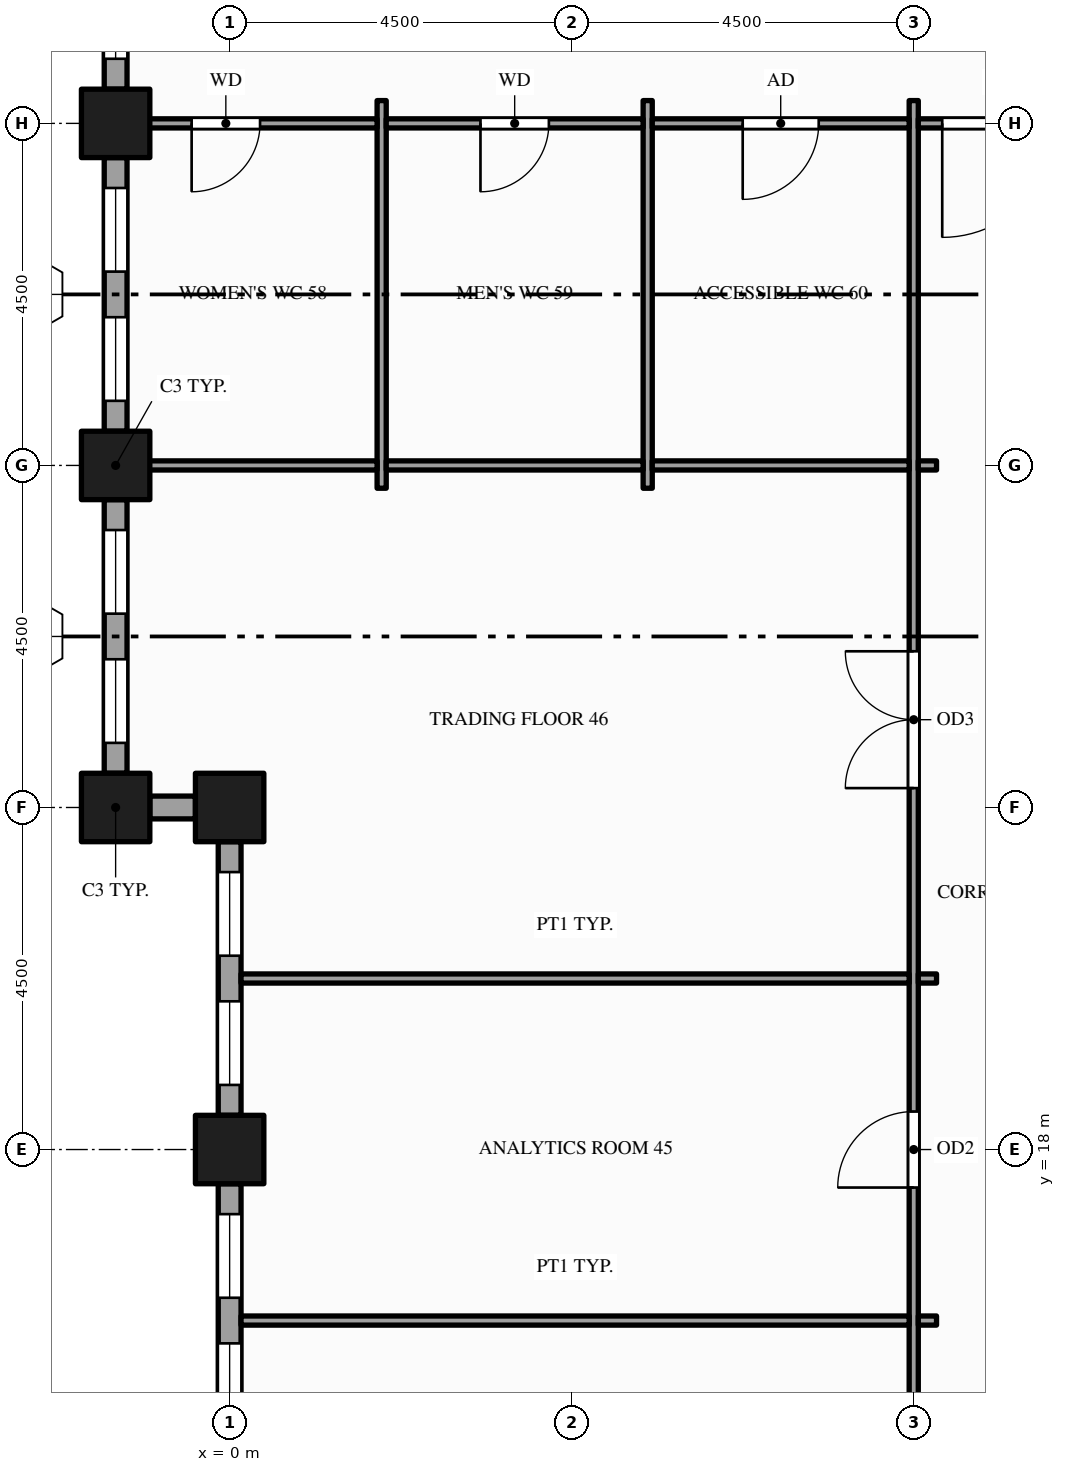
"""IFC4 building model, lengths in metres.
Left out: names, types, materials, properties, quantities, classifications, styles, units other than length and angle.
Written with IfcOpenShell. Run it as: python <this file> out.ifc"""

import sys

from ifc_helpers import new_model, si_unit, direction, frame, frame_2d, origin, origin_2d, place, context, subcontext, project, spatial, rectangle, hollow_rectangle, extrude, element, fill, save


model = new_model("IFC4")
c1 = context("Model", 3, precision=1e-05, world=origin(), true_north=direction((0.0, 1.0)))
c2 = subcontext(c1, "Body", "Model", "MODEL_VIEW")
j1 = project(units=[si_unit("LENGTHUNIT", "METRE"), si_unit("PLANEANGLEUNIT", "RADIAN")], contexts=[c1])
p1 = place(None, origin())
s1 = spatial("IfcSite", under=j1, at=p1, CompositionType="ELEMENT")
p2 = place(p1, origin())
s2 = spatial("IfcBuilding", under=s1, at=p2, CompositionType="ELEMENT")
p3 = place(p2, frame((0.0, 0.0, 143.0)))
s3 = spatial("IfcBuildingStorey", under=s2, at=p3, CompositionType="ELEMENT", Elevation=143.0)
for number, where, z_axis, x_axis in (
    (1, (-1.5, 22.5, -0.15), (0.0, 0.0, 1.0), (1.0, 0.0, 0.0)),
    (2, (-1.5, 27.0, -0.15), (0.0, 0.0, 1.0), (1.0, 0.0, 0.0)),
    (3, (-1.5, 31.5, -0.15), (0.0, 0.0, 1.0), (1.0, 0.0, 0.0)),
    (4, (0.0, 18.0, -0.15), (0.0, 0.0, 1.0), (1.0, 0.0, 0.0)),
    (5, (0.0, 22.5, -0.15), (0.0, 0.0, 1.0), (1.0, 0.0, 0.0)),
):
    element("IfcColumn", number, at=place(p3, frame(where, z_axis=z_axis, x_axis=x_axis)), inside=s3, PredefinedType="COLUMN", context=c2, shape_type="SweptSolid", body=[
        extrude(hollow_rectangle(XDim=0.9, YDim=0.9, WallThickness=0.045, at=origin_2d()), origin(), (0.0, 0.0, 1.0), 4.0),
    ])
p4 = place(p3, frame((-1.5, 35.55, 0.0), z_axis=(0.0, 0.0, 1.0), x_axis=(0.0, -1.0, 0.0)))
e6 = element("IfcWall", 6, at=p4, inside=s3, PredefinedType="STANDARD", context=c2, shape_type="SweptSolid", body=[
    extrude(rectangle(XDim=3.6, YDim=0.3, at=frame_2d((1.8, 0.0))), origin(), (0.0, 0.0, 1.0), 3.149),
])
p5 = place(p4, frame((0.4, 0.0, 0.9)))
e7 = element("IfcOpeningElement", 7, at=p5, cuts=e6, PredefinedType="OPENING", context=c2, shape_type="SweptSolid", body=[
    extrude(rectangle(XDim=1.1, YDim=2.0, at=frame_2d((0.55, 1.0))), frame((0.0, 0.16, 0.0), z_axis=(0.0, -1.0, 0.0), x_axis=(1.0, 0.0, 0.0)), (0.0, 0.0, 1.0), 0.32),
])
p6 = place(p4, frame((2.1, 0.0, 0.9)))
e8 = element("IfcOpeningElement", 8, at=p6, cuts=e6, PredefinedType="OPENING", context=c2, shape_type="SweptSolid", body=[
    extrude(rectangle(XDim=1.1, YDim=2.0, at=frame_2d((0.55, 1.0))), frame((0.0, 0.16, 0.0), z_axis=(0.0, -1.0, 0.0), x_axis=(1.0, 0.0, 0.0)), (0.0, 0.0, 1.0), 0.32),
])
p7 = place(p3, frame((-1.5, 31.05, 0.0), z_axis=(0.0, 0.0, 1.0), x_axis=(0.0, -1.0, 0.0)))
e9 = element("IfcWall", 9, at=p7, inside=s3, PredefinedType="STANDARD", context=c2, shape_type="SweptSolid", body=[
    extrude(rectangle(XDim=3.6, YDim=0.3, at=frame_2d((1.8, 0.0))), origin(), (0.0, 0.0, 1.0), 3.149),
])
p8 = place(p7, frame((0.4, 0.0, 0.9)))
e10 = element("IfcOpeningElement", 10, at=p8, cuts=e9, PredefinedType="OPENING", context=c2, shape_type="SweptSolid", body=[
    extrude(rectangle(XDim=1.1, YDim=2.0, at=frame_2d((0.55, 1.0))), frame((0.0, 0.16, 0.0), z_axis=(0.0, -1.0, 0.0), x_axis=(1.0, 0.0, 0.0)), (0.0, 0.0, 1.0), 0.32),
])
p9 = place(p7, frame((2.1, 0.0, 0.9)))
e11 = element("IfcOpeningElement", 11, at=p9, cuts=e9, PredefinedType="OPENING", context=c2, shape_type="SweptSolid", body=[
    extrude(rectangle(XDim=1.1, YDim=2.0, at=frame_2d((0.55, 1.0))), frame((0.0, 0.16, 0.0), z_axis=(0.0, -1.0, 0.0), x_axis=(1.0, 0.0, 0.0)), (0.0, 0.0, 1.0), 0.32),
])
p10 = place(p3, frame((-1.5, 26.55, 0.0), z_axis=(0.0, 0.0, 1.0), x_axis=(0.0, -1.0, 0.0)))
e12 = element("IfcWall", 12, at=p10, inside=s3, PredefinedType="STANDARD", context=c2, shape_type="SweptSolid", body=[
    extrude(rectangle(XDim=3.6, YDim=0.3, at=frame_2d((1.8, 0.0))), origin(), (0.0, 0.0, 1.0), 3.149),
])
p11 = place(p10, frame((0.4, 0.0, 0.9)))
e13 = element("IfcOpeningElement", 13, at=p11, cuts=e12, PredefinedType="OPENING", context=c2, shape_type="SweptSolid", body=[
    extrude(rectangle(XDim=1.1, YDim=2.0, at=frame_2d((0.55, 1.0))), frame((0.0, 0.16, 0.0), z_axis=(0.0, -1.0, 0.0), x_axis=(1.0, 0.0, 0.0)), (0.0, 0.0, 1.0), 0.32),
])
p12 = place(p10, frame((2.1, 0.0, 0.9)))
e14 = element("IfcOpeningElement", 14, at=p12, cuts=e12, PredefinedType="OPENING", context=c2, shape_type="SweptSolid", body=[
    extrude(rectangle(XDim=1.1, YDim=2.0, at=frame_2d((0.55, 1.0))), frame((0.0, 0.16, 0.0), z_axis=(0.0, -1.0, 0.0), x_axis=(1.0, 0.0, 0.0)), (0.0, 0.0, 1.0), 0.32),
])
p13 = place(p3, frame((-1.05, 22.5, 0.0), z_axis=(0.0, 0.0, 1.0), x_axis=(1.0, 0.0, 0.0)))
e15 = element("IfcWall", 15, at=p13, inside=s3, PredefinedType="STANDARD", context=c2, shape_type="SweptSolid", body=[
    extrude(rectangle(XDim=0.6, YDim=0.3, at=frame_2d((0.3, 0.0))), origin(), (0.0, 0.0, 1.0), 3.149),
])
p14 = place(p3, frame((0.0, 22.05, 0.0), z_axis=(0.0, 0.0, 1.0), x_axis=(0.0, -1.0, 0.0)))
e16 = element("IfcWall", 16, at=p14, inside=s3, PredefinedType="STANDARD", context=c2, shape_type="SweptSolid", body=[
    extrude(rectangle(XDim=3.6, YDim=0.3, at=frame_2d((1.8, 0.0))), origin(), (0.0, 0.0, 1.0), 3.149),
])
p15 = place(p14, frame((0.4, 0.0, 0.9)))
e17 = element("IfcOpeningElement", 17, at=p15, cuts=e16, PredefinedType="OPENING", context=c2, shape_type="SweptSolid", body=[
    extrude(rectangle(XDim=1.1, YDim=2.0, at=frame_2d((0.55, 1.0))), frame((0.0, 0.16, 0.0), z_axis=(0.0, -1.0, 0.0), x_axis=(1.0, 0.0, 0.0)), (0.0, 0.0, 1.0), 0.32),
])
p16 = place(p14, frame((2.1, 0.0, 0.9)))
e18 = element("IfcOpeningElement", 18, at=p16, cuts=e16, PredefinedType="OPENING", context=c2, shape_type="SweptSolid", body=[
    extrude(rectangle(XDim=1.1, YDim=2.0, at=frame_2d((0.55, 1.0))), frame((0.0, 0.16, 0.0), z_axis=(0.0, -1.0, 0.0), x_axis=(1.0, 0.0, 0.0)), (0.0, 0.0, 1.0), 0.32),
])
p17 = place(p3, frame((0.0, 17.55, 0.0), z_axis=(0.0, 0.0, 1.0), x_axis=(0.0, -1.0, 0.0)))
e19 = element("IfcWall", 19, at=p17, inside=s3, PredefinedType="STANDARD", context=c2, shape_type="SweptSolid", body=[
    extrude(rectangle(XDim=3.6, YDim=0.3, at=frame_2d((1.8, 0.0))), origin(), (0.0, 0.0, 1.0), 3.149),
])
p18 = place(p17, frame((0.4, 0.0, 0.9)))
e20 = element("IfcOpeningElement", 20, at=p18, cuts=e19, PredefinedType="OPENING", context=c2, shape_type="SweptSolid", body=[
    extrude(rectangle(XDim=1.1, YDim=2.0, at=frame_2d((0.55, 1.0))), frame((0.0, 0.16, 0.0), z_axis=(0.0, -1.0, 0.0), x_axis=(1.0, 0.0, 0.0)), (0.0, 0.0, 1.0), 0.32),
])
p19 = place(p17, frame((2.1, 0.0, 0.9)))
e21 = element("IfcOpeningElement", 21, at=p19, cuts=e19, PredefinedType="OPENING", context=c2, shape_type="SweptSolid", body=[
    extrude(rectangle(XDim=1.1, YDim=2.0, at=frame_2d((0.55, 1.0))), frame((0.0, 0.16, 0.0), z_axis=(0.0, -1.0, 0.0), x_axis=(1.0, 0.0, 0.0)), (0.0, 0.0, 1.0), 0.32),
])
for number, where, z_axis, x_axis in (
    (22, (2.0, 26.7, 0.0), (0.0, 0.0, 1.0), (0.0, 1.0, 0.0)),
    (23, (5.5, 26.7, 0.0), (0.0, 0.0, 1.0), (0.0, 1.0, 0.0)),
):
    element("IfcWall", number, at=place(p3, frame(where, z_axis=z_axis, x_axis=x_axis)), inside=s3, PredefinedType="PARTITIONING", context=c2, shape_type="SweptSolid", body=[
        extrude(rectangle(XDim=5.1, YDim=0.12, at=frame_2d((2.55, 0.0))), origin(), (0.0, 0.0, 1.0), 3.85),
    ])
p20 = place(p3, frame((9.0, 10.95, 0.0), z_axis=(0.0, 0.0, 1.0), x_axis=(0.0, 1.0, 0.0)))
e24 = element("IfcWall", 24, at=p20, inside=s3, PredefinedType="PARTITIONING", context=c2, shape_type="SweptSolid", body=[
    extrude(rectangle(XDim=20.85, YDim=0.12, at=frame_2d((10.425, 0.0))), origin(), (0.0, 0.0, 1.0), 2.6),
])
p21 = place(p20, frame((2.05, 0.0, 0.0)))
e25 = element("IfcOpeningElement", 25, at=p21, cuts=e24, PredefinedType="OPENING", context=c2, shape_type="SweptSolid", body=[
    extrude(rectangle(XDim=1.0, YDim=2.1, at=frame_2d((0.5, 1.05))), frame((0.0, 0.07, 0.0), z_axis=(0.0, -1.0, 0.0), x_axis=(1.0, 0.0, 0.0)), (0.0, 0.0, 1.0), 0.14),
])
p22 = place(p20, frame((6.55, 0.0, 0.0)))
e26 = element("IfcOpeningElement", 26, at=p22, cuts=e24, PredefinedType="OPENING", context=c2, shape_type="SweptSolid", body=[
    extrude(rectangle(XDim=1.0, YDim=2.1, at=frame_2d((0.5, 1.05))), frame((0.0, 0.07, 0.0), z_axis=(0.0, -1.0, 0.0), x_axis=(1.0, 0.0, 0.0)), (0.0, 0.0, 1.0), 0.14),
])
p23 = place(p20, frame((11.805, 0.0, 0.0)))
e27 = element("IfcOpeningElement", 27, at=p23, cuts=e24, PredefinedType="OPENING", context=c2, shape_type="SweptSolid", body=[
    extrude(rectangle(XDim=1.8, YDim=2.1, at=frame_2d((0.9, 1.05))), frame((0.0, 0.07, 0.0), z_axis=(0.0, -1.0, 0.0), x_axis=(1.0, 0.0, 0.0)), (0.0, 0.0, 1.0), 0.14),
])
p24 = place(p3, frame((0.15, 15.75, 0.0), z_axis=(0.0, 0.0, 1.0), x_axis=(1.0, 0.0, 0.0)))
e28 = element("IfcWall", 28, at=p24, inside=s3, PredefinedType="PARTITIONING", context=c2, shape_type="SweptSolid", body=[
    extrude(rectangle(XDim=8.79, YDim=0.12, at=frame_2d((4.395, 0.0))), origin(), (0.0, 0.0, 1.0), 2.87),
])
p25 = place(p3, frame((9.06, 15.75, 0.0), z_axis=(0.0, 0.0, 1.0), x_axis=(1.0, 0.0, 0.0)))
e29 = element("IfcWall", 29, at=p25, inside=s3, PredefinedType="PARTITIONING", context=c2, shape_type="SweptSolid", body=[
    extrude(rectangle(XDim=0.24, YDim=0.12, at=frame_2d((0.12, 0.0))), origin(), (0.0, 0.0, 1.0), 2.87),
])
p26 = place(p3, frame((0.15, 20.25, 0.0), z_axis=(0.0, 0.0, 1.0), x_axis=(1.0, 0.0, 0.0)))
e30 = element("IfcWall", 30, at=p26, inside=s3, PredefinedType="PARTITIONING", context=c2, shape_type="SweptSolid", body=[
    extrude(rectangle(XDim=8.79, YDim=0.12, at=frame_2d((4.395, 0.0))), origin(), (0.0, 0.0, 1.0), 2.87),
])
p27 = place(p3, frame((9.06, 20.25, 0.0), z_axis=(0.0, 0.0, 1.0), x_axis=(1.0, 0.0, 0.0)))
e31 = element("IfcWall", 31, at=p27, inside=s3, PredefinedType="PARTITIONING", context=c2, shape_type="SweptSolid", body=[
    extrude(rectangle(XDim=0.24, YDim=0.12, at=frame_2d((0.12, 0.0))), origin(), (0.0, 0.0, 1.0), 2.87),
])
p28 = place(p3, frame((-1.35, 27.0, 0.0), z_axis=(0.0, 0.0, 1.0), x_axis=(1.0, 0.0, 0.0)))
e32 = element("IfcWall", 32, at=p28, inside=s3, PredefinedType="PARTITIONING", context=c2, shape_type="SweptSolid", body=[
    extrude(rectangle(XDim=3.29, YDim=0.12, at=frame_2d((1.645, 0.0))), origin(), (0.0, 0.0, 1.0), 2.87),
])
for number, where, z_axis, x_axis in (
    (33, (2.06, 27.0, 0.0), (0.0, 0.0, 1.0), (1.0, 0.0, 0.0)),
    (34, (5.56, 27.0, 0.0), (0.0, 0.0, 1.0), (1.0, 0.0, 0.0)),
):
    element("IfcWall", number, at=place(p3, frame(where, z_axis=z_axis, x_axis=x_axis)), inside=s3, PredefinedType="PARTITIONING", context=c2, shape_type="SweptSolid", body=[
        extrude(rectangle(XDim=3.38, YDim=0.12, at=frame_2d((1.69, 0.0))), origin(), (0.0, 0.0, 1.0), 2.87),
    ])
p29 = place(p3, frame((9.06, 27.0, 0.0), z_axis=(0.0, 0.0, 1.0), x_axis=(1.0, 0.0, 0.0)))
e35 = element("IfcWall", 35, at=p29, inside=s3, PredefinedType="PARTITIONING", context=c2, shape_type="SweptSolid", body=[
    extrude(rectangle(XDim=0.24, YDim=0.12, at=frame_2d((0.12, 0.0))), origin(), (0.0, 0.0, 1.0), 2.87),
])
p30 = place(p3, frame((-1.35, 31.5, 0.0), z_axis=(0.0, 0.0, 1.0), x_axis=(1.0, 0.0, 0.0)))
e36 = element("IfcWall", 36, at=p30, inside=s3, PredefinedType="PARTITIONING", context=c2, shape_type="SweptSolid", body=[
    extrude(rectangle(XDim=3.29, YDim=0.12, at=frame_2d((1.645, 0.0))), origin(), (0.0, 0.0, 1.0), 2.87),
])
p31 = place(p30, frame((0.85, 0.0, 0.0)))
e37 = element("IfcOpeningElement", 37, at=p31, cuts=e36, PredefinedType="OPENING", context=c2, shape_type="SweptSolid", body=[
    extrude(rectangle(XDim=0.9, YDim=2.1, at=frame_2d((0.45, 1.05))), frame((0.0, 0.07, 0.0), z_axis=(0.0, -1.0, 0.0), x_axis=(1.0, 0.0, 0.0)), (0.0, 0.0, 1.0), 0.14),
])
p32 = place(p3, frame((2.06, 31.5, 0.0), z_axis=(0.0, 0.0, 1.0), x_axis=(1.0, 0.0, 0.0)))
e38 = element("IfcWall", 38, at=p32, inside=s3, PredefinedType="PARTITIONING", context=c2, shape_type="SweptSolid", body=[
    extrude(rectangle(XDim=3.38, YDim=0.12, at=frame_2d((1.69, 0.0))), origin(), (0.0, 0.0, 1.0), 2.87),
])
p33 = place(p32, frame((1.24, 0.0, 0.0)))
e39 = element("IfcOpeningElement", 39, at=p33, cuts=e38, PredefinedType="OPENING", context=c2, shape_type="SweptSolid", body=[
    extrude(rectangle(XDim=0.9, YDim=2.1, at=frame_2d((0.45, 1.05))), frame((0.0, 0.07, 0.0), z_axis=(0.0, -1.0, 0.0), x_axis=(1.0, 0.0, 0.0)), (0.0, 0.0, 1.0), 0.14),
])
p34 = place(p3, frame((5.56, 31.5, 0.0), z_axis=(0.0, 0.0, 1.0), x_axis=(1.0, 0.0, 0.0)))
e40 = element("IfcWall", 40, at=p34, inside=s3, PredefinedType="PARTITIONING", context=c2, shape_type="SweptSolid", body=[
    extrude(rectangle(XDim=3.38, YDim=0.12, at=frame_2d((1.69, 0.0))), origin(), (0.0, 0.0, 1.0), 2.87),
])
p35 = place(p34, frame((1.19, 0.0, 0.0)))
e41 = element("IfcOpeningElement", 41, at=p35, cuts=e40, PredefinedType="OPENING", context=c2, shape_type="SweptSolid", body=[
    extrude(rectangle(XDim=1.0, YDim=2.1, at=frame_2d((0.5, 1.05))), frame((0.0, 0.07, 0.0), z_axis=(0.0, -1.0, 0.0), x_axis=(1.0, 0.0, 0.0)), (0.0, 0.0, 1.0), 0.14),
])
p36 = place(p3, frame((9.06, 31.5, 0.0), z_axis=(0.0, 0.0, 1.0), x_axis=(1.0, 0.0, 0.0)))
e42 = element("IfcWall", 42, at=p36, inside=s3, PredefinedType="PARTITIONING", context=c2, shape_type="SweptSolid", body=[
    extrude(rectangle(XDim=2.13, YDim=0.12, at=frame_2d((1.065, 0.0))), origin(), (0.0, 0.0, 1.0), 2.87),
])
p37 = place(p36, frame((0.315, 0.0, 0.0)))
e43 = element("IfcOpeningElement", 43, at=p37, cuts=e42, PredefinedType="OPENING", context=c2, shape_type="SweptSolid", body=[
    extrude(rectangle(XDim=1.5, YDim=2.1, at=frame_2d((0.75, 1.05))), frame((0.0, 0.07, 0.0), z_axis=(0.0, -1.0, 0.0), x_axis=(1.0, 0.0, 0.0)), (0.0, 0.0, 1.0), 0.14),
])
p38 = place(p6, origin())
e44 = element("IfcWindow", 44, at=p38, inside=s3, PartitioningType="SINGLE_PANEL", PredefinedType="WINDOW", context=c2, shape_type="SweptSolid", body=[
    extrude(rectangle(XDim=1.1, YDim=2.0, at=frame_2d((0.55, 1.0))), frame((0.0, 0.03, 0.0), z_axis=(0.0, -1.0, 0.0), x_axis=(1.0, 0.0, 0.0)), (0.0, 0.0, 1.0), 0.06),
])
fill(e8, e44)
p39 = place(p8, origin())
e45 = element("IfcWindow", 45, at=p39, inside=s3, PartitioningType="SINGLE_PANEL", PredefinedType="WINDOW", context=c2, shape_type="SweptSolid", body=[
    extrude(rectangle(XDim=1.1, YDim=2.0, at=frame_2d((0.55, 1.0))), frame((0.0, 0.03, 0.0), z_axis=(0.0, -1.0, 0.0), x_axis=(1.0, 0.0, 0.0)), (0.0, 0.0, 1.0), 0.06),
])
fill(e10, e45)
p40 = place(p9, origin())
e46 = element("IfcWindow", 46, at=p40, inside=s3, PartitioningType="SINGLE_PANEL", PredefinedType="WINDOW", context=c2, shape_type="SweptSolid", body=[
    extrude(rectangle(XDim=1.1, YDim=2.0, at=frame_2d((0.55, 1.0))), frame((0.0, 0.03, 0.0), z_axis=(0.0, -1.0, 0.0), x_axis=(1.0, 0.0, 0.0)), (0.0, 0.0, 1.0), 0.06),
])
fill(e11, e46)
p41 = place(p11, origin())
e47 = element("IfcWindow", 47, at=p41, inside=s3, PartitioningType="SINGLE_PANEL", PredefinedType="WINDOW", context=c2, shape_type="SweptSolid", body=[
    extrude(rectangle(XDim=1.1, YDim=2.0, at=frame_2d((0.55, 1.0))), frame((0.0, 0.03, 0.0), z_axis=(0.0, -1.0, 0.0), x_axis=(1.0, 0.0, 0.0)), (0.0, 0.0, 1.0), 0.06),
])
fill(e13, e47)
p42 = place(p12, origin())
e48 = element("IfcWindow", 48, at=p42, inside=s3, PartitioningType="SINGLE_PANEL", PredefinedType="WINDOW", context=c2, shape_type="SweptSolid", body=[
    extrude(rectangle(XDim=1.1, YDim=2.0, at=frame_2d((0.55, 1.0))), frame((0.0, 0.03, 0.0), z_axis=(0.0, -1.0, 0.0), x_axis=(1.0, 0.0, 0.0)), (0.0, 0.0, 1.0), 0.06),
])
fill(e14, e48)
p43 = place(p15, origin())
e49 = element("IfcWindow", 49, at=p43, inside=s3, PartitioningType="SINGLE_PANEL", PredefinedType="WINDOW", context=c2, shape_type="SweptSolid", body=[
    extrude(rectangle(XDim=1.1, YDim=2.0, at=frame_2d((0.55, 1.0))), frame((0.0, 0.03, 0.0), z_axis=(0.0, -1.0, 0.0), x_axis=(1.0, 0.0, 0.0)), (0.0, 0.0, 1.0), 0.06),
])
fill(e17, e49)
p44 = place(p16, origin())
e50 = element("IfcWindow", 50, at=p44, inside=s3, PartitioningType="SINGLE_PANEL", PredefinedType="WINDOW", context=c2, shape_type="SweptSolid", body=[
    extrude(rectangle(XDim=1.1, YDim=2.0, at=frame_2d((0.55, 1.0))), frame((0.0, 0.03, 0.0), z_axis=(0.0, -1.0, 0.0), x_axis=(1.0, 0.0, 0.0)), (0.0, 0.0, 1.0), 0.06),
])
fill(e18, e50)
p45 = place(p18, origin())
e51 = element("IfcWindow", 51, at=p45, inside=s3, PartitioningType="SINGLE_PANEL", PredefinedType="WINDOW", context=c2, shape_type="SweptSolid", body=[
    extrude(rectangle(XDim=1.1, YDim=2.0, at=frame_2d((0.55, 1.0))), frame((0.0, 0.03, 0.0), z_axis=(0.0, -1.0, 0.0), x_axis=(1.0, 0.0, 0.0)), (0.0, 0.0, 1.0), 0.06),
])
fill(e20, e51)
p46 = place(p19, origin())
e52 = element("IfcWindow", 52, at=p46, inside=s3, PartitioningType="SINGLE_PANEL", PredefinedType="WINDOW", context=c2, shape_type="SweptSolid", body=[
    extrude(rectangle(XDim=1.1, YDim=2.0, at=frame_2d((0.55, 1.0))), frame((0.0, 0.03, 0.0), z_axis=(0.0, -1.0, 0.0), x_axis=(1.0, 0.0, 0.0)), (0.0, 0.0, 1.0), 0.06),
])
fill(e21, e52)
p47 = place(p37, origin())
e53 = element("IfcDoor", 53, at=p47, inside=s3, OperationType="SINGLE_SWING_LEFT", PredefinedType="DOOR", context=c2, shape_type="SweptSolid", body=[
    extrude(rectangle(XDim=1.5, YDim=2.1, at=frame_2d((0.75, 1.05))), frame((0.0, 0.025, 0.0), z_axis=(0.0, -1.0, 0.0), x_axis=(1.0, 0.0, 0.0)), (0.0, 0.0, 1.0), 0.05),
])
fill(e43, e53)
p48 = place(p22, origin())
e54 = element("IfcDoor", 54, at=p48, inside=s3, OperationType="SINGLE_SWING_LEFT", PredefinedType="DOOR", context=c2, shape_type="SweptSolid", body=[
    extrude(rectangle(XDim=1.0, YDim=2.1, at=frame_2d((0.5, 1.05))), frame((0.0, 0.025, 0.0), z_axis=(0.0, -1.0, 0.0), x_axis=(1.0, 0.0, 0.0)), (0.0, 0.0, 1.0), 0.05),
])
fill(e26, e54)
p49 = place(p23, origin())
e55 = element("IfcDoor", 55, at=p49, inside=s3, OperationType="DOUBLE_DOOR_SINGLE_SWING", PredefinedType="DOOR", context=c2, shape_type="SweptSolid", body=[
    extrude(rectangle(XDim=1.8, YDim=2.1, at=frame_2d((0.9, 1.05))), frame((0.0, 0.025, 0.0), z_axis=(0.0, -1.0, 0.0), x_axis=(1.0, 0.0, 0.0)), (0.0, 0.0, 1.0), 0.05),
])
fill(e27, e55)
p50 = place(p31, origin())
e56 = element("IfcDoor", 56, at=p50, inside=s3, OperationType="SINGLE_SWING_LEFT", PredefinedType="DOOR", context=c2, shape_type="SweptSolid", body=[
    extrude(rectangle(XDim=0.9, YDim=2.1, at=frame_2d((0.45, 1.05))), frame((0.0, 0.025, 0.0), z_axis=(0.0, -1.0, 0.0), x_axis=(1.0, 0.0, 0.0)), (0.0, 0.0, 1.0), 0.05),
])
fill(e37, e56)
p51 = place(p33, origin())
e57 = element("IfcDoor", 57, at=p51, inside=s3, OperationType="SINGLE_SWING_LEFT", PredefinedType="DOOR", context=c2, shape_type="SweptSolid", body=[
    extrude(rectangle(XDim=0.9, YDim=2.1, at=frame_2d((0.45, 1.05))), frame((0.0, 0.025, 0.0), z_axis=(0.0, -1.0, 0.0), x_axis=(1.0, 0.0, 0.0)), (0.0, 0.0, 1.0), 0.05),
])
fill(e39, e57)
p52 = place(p35, origin())
e58 = element("IfcDoor", 58, at=p52, inside=s3, OperationType="SINGLE_SWING_LEFT", PredefinedType="DOOR", context=c2, shape_type="SweptSolid", body=[
    extrude(rectangle(XDim=1.0, YDim=2.1, at=frame_2d((0.5, 1.05))), frame((0.0, 0.025, 0.0), z_axis=(0.0, -1.0, 0.0), x_axis=(1.0, 0.0, 0.0)), (0.0, 0.0, 1.0), 0.05),
])
fill(e41, e58)
save(model, sys.argv[1])
